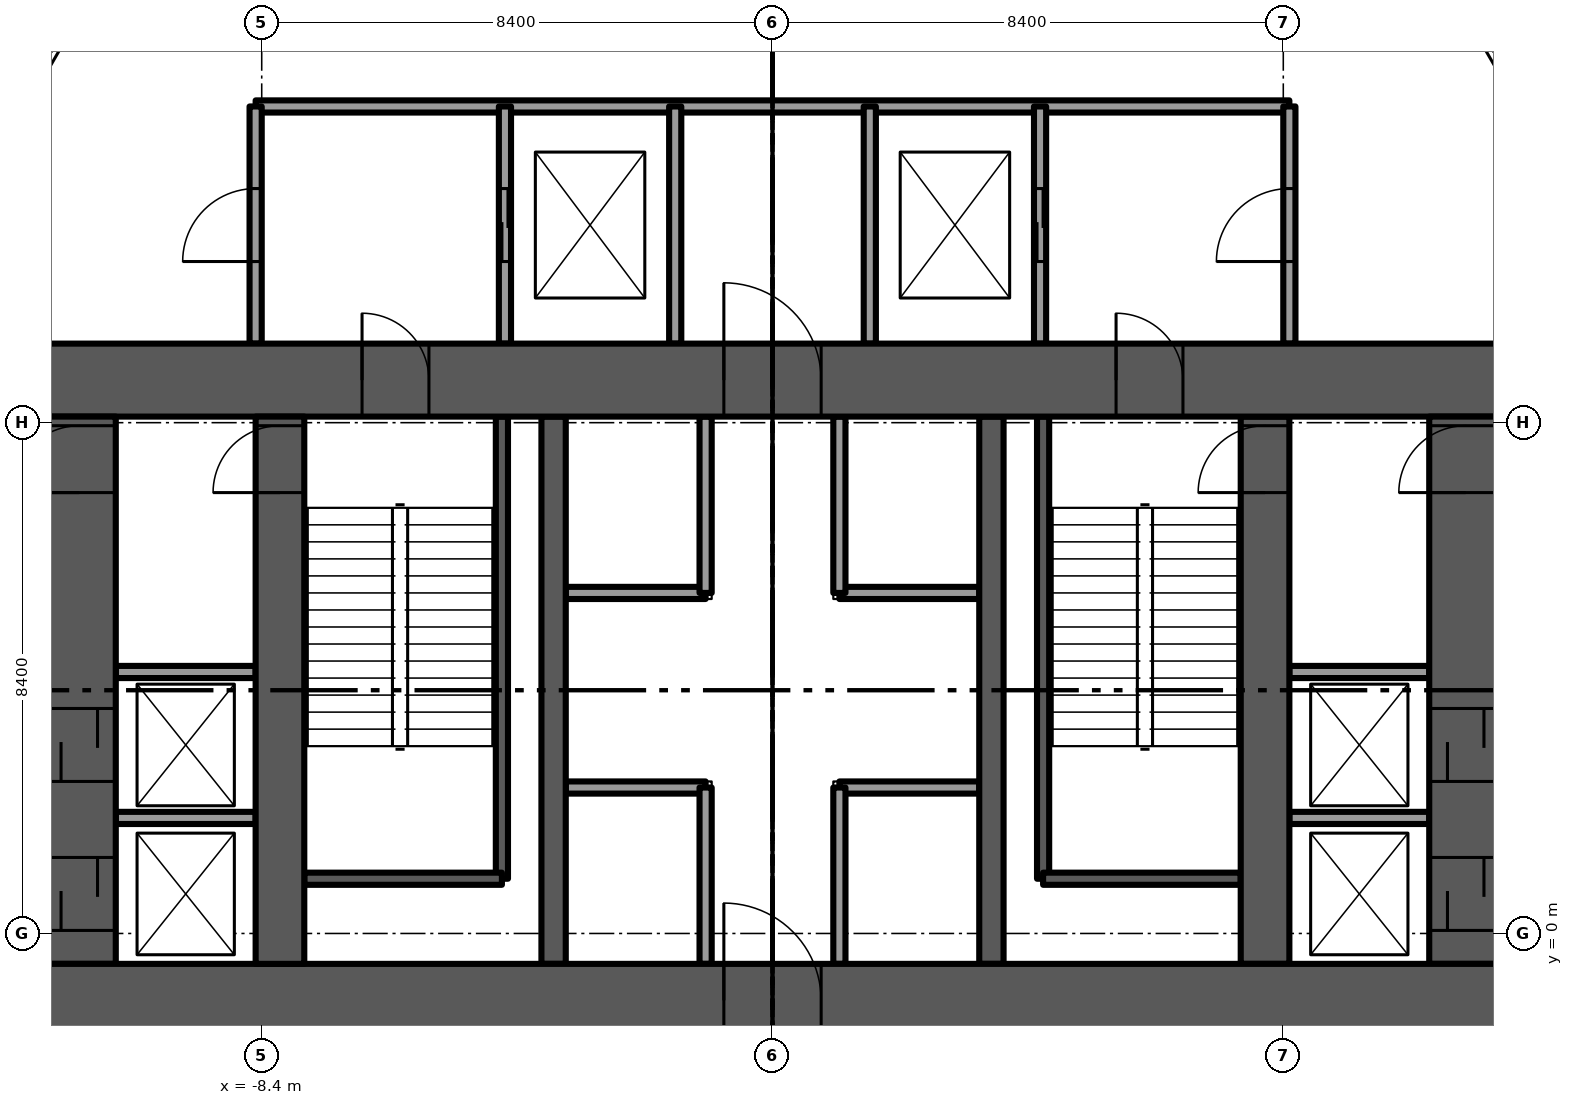
"""IFC4 building model, lengths in metres.
Left out: names, types, materials, properties, quantities, classifications, styles, units other than length and angle.
Written with IfcOpenShell. Run it as: python <this file> out.ifc"""

import sys

from ifc_helpers import new_model, si_unit, direction, frame, frame_2d, origin, place, context, subcontext, project, spatial, rectangle, extrude, element, fill, save


model = new_model("IFC4")
c1 = context("Model", 3, precision=1e-05, world=origin(), true_north=direction((0.0, 1.0)))
c2 = subcontext(c1, "Body", "Model", "MODEL_VIEW")
j1 = project(units=[si_unit("LENGTHUNIT", "METRE"), si_unit("PLANEANGLEUNIT", "RADIAN")], contexts=[c1])
p1 = place(None, origin())
s1 = spatial("IfcSite", under=j1, at=p1, CompositionType="ELEMENT")
p2 = place(p1, origin())
s2 = spatial("IfcBuilding", under=s1, at=p2, CompositionType="ELEMENT")
p3 = place(p2, frame((0.0, 0.0, 80.5)))
s3 = spatial("IfcBuildingStorey", under=s2, at=p3, CompositionType="ELEMENT", Elevation=80.5)
p4 = place(p3, frame((-12.0, -1.1, -0.3), z_axis=(0.0, 0.0, 1.0), x_axis=(1.0, 0.0, 0.0)))
e1 = element("IfcWall", 1, at=p4, inside=s3, PredefinedType="SHEAR", context=c2, shape_type="SweptSolid", body=[
    extrude(rectangle(XDim=24.0, YDim=1.2, at=frame_2d((12.0, 0.0))), origin(), (0.0, 0.0, 1.0), 5.0),
])
p5 = place(p4, frame((11.2, 0.0, 0.0)))
e2 = element("IfcOpeningElement", 2, at=p5, cuts=e1, PredefinedType="OPENING", context=c2, shape_type="SweptSolid", body=[
    extrude(rectangle(XDim=1.6, YDim=2.1, at=frame_2d((0.8, 1.05))), frame((0.0, 0.6, 0.0), z_axis=(0.0, -1.0, 0.0), x_axis=(1.0, 0.0, 0.0)), (0.0, 0.0, 1.0), 1.2),
])
p6 = place(p3, frame((-12.0, 9.1, -0.3), z_axis=(0.0, 0.0, 1.0), x_axis=(1.0, 0.0, 0.0)))
e3 = element("IfcWall", 3, at=p6, inside=s3, PredefinedType="SHEAR", context=c2, shape_type="SweptSolid", body=[
    extrude(rectangle(XDim=24.0, YDim=1.2, at=frame_2d((12.0, 0.0))), origin(), (0.0, 0.0, 1.0), 5.0),
])
p7 = place(p6, frame((11.2, 0.0, 0.0)))
e4 = element("IfcOpeningElement", 4, at=p7, cuts=e3, PredefinedType="OPENING", context=c2, shape_type="SweptSolid", body=[
    extrude(rectangle(XDim=1.6, YDim=2.1, at=frame_2d((0.8, 1.05))), frame((0.0, 0.6, 0.0), z_axis=(0.0, -1.0, 0.0), x_axis=(1.0, 0.0, 0.0)), (0.0, 0.0, 1.0), 1.2),
])
p8 = place(p6, frame((5.25, 0.0, 0.0)))
e5 = element("IfcOpeningElement", 5, at=p8, cuts=e3, PredefinedType="OPENING", context=c2, shape_type="SweptSolid", body=[
    extrude(rectangle(XDim=1.1, YDim=2.1, at=frame_2d((0.55, 1.05))), frame((0.0, 0.6, 0.0), z_axis=(0.0, -1.0, 0.0), x_axis=(1.0, 0.0, 0.0)), (0.0, 0.0, 1.0), 1.2),
])
p9 = place(p6, frame((17.65, 0.0, 0.0)))
e6 = element("IfcOpeningElement", 6, at=p9, cuts=e3, PredefinedType="OPENING", context=c2, shape_type="SweptSolid", body=[
    extrude(rectangle(XDim=1.1, YDim=2.1, at=frame_2d((0.55, 1.05))), frame((0.0, 0.6, 0.0), z_axis=(0.0, -1.0, 0.0), x_axis=(1.0, 0.0, 0.0)), (0.0, 0.0, 1.0), 1.2),
])
p10 = place(p3, frame((-8.1, -0.5, -0.3), z_axis=(0.0, 0.0, 1.0), x_axis=(0.0, 1.0, 0.0)))
e7 = element("IfcWall", 7, at=p10, inside=s3, PredefinedType="SHEAR", context=c2, shape_type="SweptSolid", body=[
    extrude(rectangle(XDim=9.0, YDim=0.8, at=frame_2d((4.5, 0.0))), origin(), (0.0, 0.0, 1.0), 5.0),
])
p11 = place(p10, frame((7.75, 0.0, 0.0)))
e8 = element("IfcOpeningElement", 8, at=p11, cuts=e7, PredefinedType="OPENING", context=c2, shape_type="SweptSolid", body=[
    extrude(rectangle(XDim=1.1, YDim=2.1, at=frame_2d((0.55, 1.05))), frame((0.0, 0.4, 0.0), z_axis=(0.0, -1.0, 0.0), x_axis=(1.0, 0.0, 0.0)), (0.0, 0.0, 1.0), 0.8),
])
p12 = place(p3, frame((8.1, -0.5, -0.3), z_axis=(0.0, 0.0, 1.0), x_axis=(0.0, 1.0, 0.0)))
e9 = element("IfcWall", 9, at=p12, inside=s3, PredefinedType="SHEAR", context=c2, shape_type="SweptSolid", body=[
    extrude(rectangle(XDim=9.0, YDim=0.8, at=frame_2d((4.5, 0.0))), origin(), (0.0, 0.0, 1.0), 5.0),
])
p13 = place(p12, frame((7.75, 0.0, 0.0)))
e10 = element("IfcOpeningElement", 10, at=p13, cuts=e9, PredefinedType="OPENING", context=c2, shape_type="SweptSolid", body=[
    extrude(rectangle(XDim=1.1, YDim=2.1, at=frame_2d((0.55, 1.05))), frame((0.0, 0.4, 0.0), z_axis=(0.0, -1.0, 0.0), x_axis=(1.0, 0.0, 0.0)), (0.0, 0.0, 1.0), 0.8),
])
for number, where, z_axis, x_axis in (
    (11, (-3.6, -0.5, -0.3), (0.0, 0.0, 1.0), (0.0, 1.0, 0.0)),
    (12, (3.6, -0.5, -0.3), (0.0, 0.0, 1.0), (0.0, 1.0, 0.0)),
):
    element("IfcWall", number, at=place(p3, frame(where, z_axis=z_axis, x_axis=x_axis)), inside=s3, PredefinedType="SHEAR", context=c2, shape_type="SweptSolid", body=[
        extrude(rectangle(XDim=9.0, YDim=0.4, at=frame_2d((4.5, 0.0))), origin(), (0.0, 0.0, 1.0), 5.0),
    ])
p14 = place(p3, frame((-11.4, -0.5, -0.3), z_axis=(0.0, 0.0, 1.0), x_axis=(0.0, 1.0, 0.0)))
e13 = element("IfcWall", 13, at=p14, inside=s3, PredefinedType="SHEAR", context=c2, shape_type="SweptSolid", body=[
    extrude(rectangle(XDim=9.0, YDim=1.2, at=frame_2d((4.5, 0.0))), origin(), (0.0, 0.0, 1.0), 5.0),
])
p15 = place(p14, frame((7.75, 0.0, 0.0)))
e14 = element("IfcOpeningElement", 14, at=p15, cuts=e13, PredefinedType="OPENING", context=c2, shape_type="SweptSolid", body=[
    extrude(rectangle(XDim=1.1, YDim=2.1, at=frame_2d((0.55, 1.05))), frame((0.0, 0.6, 0.0), z_axis=(0.0, -1.0, 0.0), x_axis=(1.0, 0.0, 0.0)), (0.0, 0.0, 1.0), 1.2),
])
p16 = place(p14, frame((0.55, 0.0, 0.0)))
e15 = element("IfcOpeningElement", 15, at=p16, cuts=e13, PredefinedType="OPENING", context=c2, shape_type="SweptSolid", body=[
    extrude(rectangle(XDim=1.2, YDim=2.1, at=frame_2d((0.6, 1.05))), frame((0.0, 0.6, 0.0), z_axis=(0.0, -1.0, 0.0), x_axis=(1.0, 0.0, 0.0)), (0.0, 0.0, 1.0), 1.2),
])
p17 = place(p14, frame((3.0, 0.0, 0.0)))
e16 = element("IfcOpeningElement", 16, at=p17, cuts=e13, PredefinedType="OPENING", context=c2, shape_type="SweptSolid", body=[
    extrude(rectangle(XDim=1.2, YDim=2.1, at=frame_2d((0.6, 1.05))), frame((0.0, 0.6, 0.0), z_axis=(0.0, -1.0, 0.0), x_axis=(1.0, 0.0, 0.0)), (0.0, 0.0, 1.0), 1.2),
])
p18 = place(p3, frame((11.4, -0.5, -0.3), z_axis=(0.0, 0.0, 1.0), x_axis=(0.0, 1.0, 0.0)))
e17 = element("IfcWall", 17, at=p18, inside=s3, PredefinedType="SHEAR", context=c2, shape_type="SweptSolid", body=[
    extrude(rectangle(XDim=9.0, YDim=1.2, at=frame_2d((4.5, 0.0))), origin(), (0.0, 0.0, 1.0), 5.0),
])
p19 = place(p18, frame((7.75, 0.0, 0.0)))
e18 = element("IfcOpeningElement", 18, at=p19, cuts=e17, PredefinedType="OPENING", context=c2, shape_type="SweptSolid", body=[
    extrude(rectangle(XDim=1.1, YDim=2.1, at=frame_2d((0.55, 1.05))), frame((0.0, 0.6, 0.0), z_axis=(0.0, -1.0, 0.0), x_axis=(1.0, 0.0, 0.0)), (0.0, 0.0, 1.0), 1.2),
])
p20 = place(p18, frame((0.55, 0.0, 0.0)))
e19 = element("IfcOpeningElement", 19, at=p20, cuts=e17, PredefinedType="OPENING", context=c2, shape_type="SweptSolid", body=[
    extrude(rectangle(XDim=1.2, YDim=2.1, at=frame_2d((0.6, 1.05))), frame((0.0, 0.6, 0.0), z_axis=(0.0, -1.0, 0.0), x_axis=(1.0, 0.0, 0.0)), (0.0, 0.0, 1.0), 1.2),
])
p21 = place(p18, frame((3.0, 0.0, 0.0)))
e20 = element("IfcOpeningElement", 20, at=p21, cuts=e17, PredefinedType="OPENING", context=c2, shape_type="SweptSolid", body=[
    extrude(rectangle(XDim=1.2, YDim=2.1, at=frame_2d((0.6, 1.05))), frame((0.0, 0.6, 0.0), z_axis=(0.0, -1.0, 0.0), x_axis=(1.0, 0.0, 0.0)), (0.0, 0.0, 1.0), 1.2),
])
for number, where, z_axis, x_axis in (
    (21, (-3.4, 2.4, 0.0), (0.0, 0.0, 1.0), (1.0, 0.0, 0.0)),
    (22, (-3.4, 5.6, 0.0), (0.0, 0.0, 1.0), (1.0, 0.0, 0.0)),
    (23, (1.1, 2.4, 0.0), (0.0, 0.0, 1.0), (1.0, 0.0, 0.0)),
    (24, (1.1, 5.6, 0.0), (0.0, 0.0, 1.0), (1.0, 0.0, 0.0)),
):
    element("IfcWall", number, at=place(p3, frame(where, z_axis=z_axis, x_axis=x_axis)), inside=s3, PredefinedType="PARTITIONING", context=c2, shape_type="SweptSolid", body=[
        extrude(rectangle(XDim=2.3, YDim=0.2, at=frame_2d((1.15, 0.0))), origin(), (0.0, 0.0, 1.0), 4.7),
    ])
for number, where, z_axis, x_axis in (
    (25, (-1.1, -0.5, 0.0), (0.0, 0.0, 1.0), (0.0, 1.0, 0.0)),
    (26, (1.1, -0.5, 0.0), (0.0, 0.0, 1.0), (0.0, 1.0, 0.0)),
    (27, (-1.1, 5.6, 0.0), (0.0, 0.0, 1.0), (0.0, 1.0, 0.0)),
    (28, (1.1, 5.6, 0.0), (0.0, 0.0, 1.0), (0.0, 1.0, 0.0)),
):
    element("IfcWall", number, at=place(p3, frame(where, z_axis=z_axis, x_axis=x_axis)), inside=s3, PredefinedType="PARTITIONING", context=c2, shape_type="SweptSolid", body=[
        extrude(rectangle(XDim=2.9, YDim=0.2, at=frame_2d((1.45, 0.0))), origin(), (0.0, 0.0, 1.0), 4.7),
    ])
p22 = place(p3, frame((-4.45, 0.9, -0.3), z_axis=(0.0, 0.0, 1.0), x_axis=(0.0, 1.0, 0.0)))
e29 = element("IfcWall", 29, at=p22, inside=s3, PredefinedType="SOLIDWALL", context=c2, shape_type="SweptSolid", body=[
    extrude(rectangle(XDim=7.6, YDim=0.2, at=frame_2d((3.8, 0.0))), origin(), (0.0, 0.0, 1.0), 5.0),
])
p23 = place(p3, frame((-7.7, 0.9, -0.3), z_axis=(0.0, 0.0, 1.0), x_axis=(1.0, 0.0, 0.0)))
e30 = element("IfcWall", 30, at=p23, inside=s3, PredefinedType="SOLIDWALL", context=c2, shape_type="SweptSolid", body=[
    extrude(rectangle(XDim=3.25, YDim=0.2, at=frame_2d((1.625, 0.0))), origin(), (0.0, 0.0, 1.0), 5.0),
])
p24 = place(p3, frame((4.45, 0.9, -0.3), z_axis=(0.0, 0.0, 1.0), x_axis=(0.0, 1.0, 0.0)))
e31 = element("IfcWall", 31, at=p24, inside=s3, PredefinedType="SOLIDWALL", context=c2, shape_type="SweptSolid", body=[
    extrude(rectangle(XDim=7.6, YDim=0.2, at=frame_2d((3.8, 0.0))), origin(), (0.0, 0.0, 1.0), 5.0),
])
p25 = place(p3, frame((4.45, 0.9, -0.3), z_axis=(0.0, 0.0, 1.0), x_axis=(1.0, 0.0, 0.0)))
e32 = element("IfcWall", 32, at=p25, inside=s3, PredefinedType="SOLIDWALL", context=c2, shape_type="SweptSolid", body=[
    extrude(rectangle(XDim=3.25, YDim=0.2, at=frame_2d((1.625, 0.0))), origin(), (0.0, 0.0, 1.0), 5.0),
])
p26 = place(p3, frame((-8.5, 13.6, 0.0), z_axis=(0.0, 0.0, 1.0), x_axis=(1.0, 0.0, 0.0)))
e33 = element("IfcWall", 33, at=p26, inside=s3, PredefinedType="PARTITIONING", context=c2, shape_type="SweptSolid", body=[
    extrude(rectangle(XDim=17.0, YDim=0.2, at=frame_2d((8.5, 0.0))), origin(), (0.0, 0.0, 1.0), 4.7),
])
p27 = place(p3, frame((-8.5, 9.7, 0.0), z_axis=(0.0, 0.0, 1.0), x_axis=(0.0, 1.0, 0.0)))
e34 = element("IfcWall", 34, at=p27, inside=s3, PredefinedType="PARTITIONING", context=c2, shape_type="SweptSolid", body=[
    extrude(rectangle(XDim=3.9, YDim=0.2, at=frame_2d((1.95, 0.0))), origin(), (0.0, 0.0, 1.0), 4.7),
])
p28 = place(p27, frame((1.35, 0.0, 0.0)))
e35 = element("IfcOpeningElement", 35, at=p28, cuts=e34, PredefinedType="OPENING", context=c2, shape_type="SweptSolid", body=[
    extrude(rectangle(XDim=1.2, YDim=2.1, at=frame_2d((0.6, 1.05))), frame((0.0, 0.1, 0.0), z_axis=(0.0, -1.0, 0.0), x_axis=(1.0, 0.0, 0.0)), (0.0, 0.0, 1.0), 0.2),
])
p29 = place(p3, frame((8.5, 9.7, 0.0), z_axis=(0.0, 0.0, 1.0), x_axis=(0.0, 1.0, 0.0)))
e36 = element("IfcWall", 36, at=p29, inside=s3, PredefinedType="PARTITIONING", context=c2, shape_type="SweptSolid", body=[
    extrude(rectangle(XDim=3.9, YDim=0.2, at=frame_2d((1.95, 0.0))), origin(), (0.0, 0.0, 1.0), 4.7),
])
p30 = place(p29, frame((1.35, 0.0, 0.0)))
e37 = element("IfcOpeningElement", 37, at=p30, cuts=e36, PredefinedType="OPENING", context=c2, shape_type="SweptSolid", body=[
    extrude(rectangle(XDim=1.2, YDim=2.1, at=frame_2d((0.6, 1.05))), frame((0.0, 0.1, 0.0), z_axis=(0.0, -1.0, 0.0), x_axis=(1.0, 0.0, 0.0)), (0.0, 0.0, 1.0), 0.2),
])
p31 = place(p3, frame((-4.4, 9.7, 0.0), z_axis=(0.0, 0.0, 1.0), x_axis=(0.0, 1.0, 0.0)))
e38 = element("IfcWall", 38, at=p31, inside=s3, PredefinedType="PARTITIONING", context=c2, shape_type="SweptSolid", body=[
    extrude(rectangle(XDim=3.9, YDim=0.2, at=frame_2d((1.95, 0.0))), origin(), (0.0, 0.0, 1.0), 4.7),
])
p32 = place(p31, frame((1.35, 0.0, 0.0)))
e39 = element("IfcOpeningElement", 39, at=p32, cuts=e38, PredefinedType="OPENING", context=c2, shape_type="SweptSolid", body=[
    extrude(rectangle(XDim=1.2, YDim=2.1, at=frame_2d((0.6, 1.05))), frame((0.0, 0.1, 0.0), z_axis=(0.0, -1.0, 0.0), x_axis=(1.0, 0.0, 0.0)), (0.0, 0.0, 1.0), 0.2),
])
p33 = place(p3, frame((4.4, 9.7, 0.0), z_axis=(0.0, 0.0, 1.0), x_axis=(0.0, 1.0, 0.0)))
e40 = element("IfcWall", 40, at=p33, inside=s3, PredefinedType="PARTITIONING", context=c2, shape_type="SweptSolid", body=[
    extrude(rectangle(XDim=3.9, YDim=0.2, at=frame_2d((1.95, 0.0))), origin(), (0.0, 0.0, 1.0), 4.7),
])
p34 = place(p33, frame((1.35, 0.0, 0.0)))
e41 = element("IfcOpeningElement", 41, at=p34, cuts=e40, PredefinedType="OPENING", context=c2, shape_type="SweptSolid", body=[
    extrude(rectangle(XDim=1.2, YDim=2.1, at=frame_2d((0.6, 1.05))), frame((0.0, 0.1, 0.0), z_axis=(0.0, -1.0, 0.0), x_axis=(1.0, 0.0, 0.0)), (0.0, 0.0, 1.0), 0.2),
])
for number, where, z_axis, x_axis in (
    (42, (-1.6, 9.7, 0.0), (0.0, 0.0, 1.0), (0.0, 1.0, 0.0)),
    (43, (1.6, 9.7, 0.0), (0.0, 0.0, 1.0), (0.0, 1.0, 0.0)),
):
    element("IfcWall", number, at=place(p3, frame(where, z_axis=z_axis, x_axis=x_axis)), inside=s3, PredefinedType="PARTITIONING", context=c2, shape_type="SweptSolid", body=[
        extrude(rectangle(XDim=3.9, YDim=0.2, at=frame_2d((1.95, 0.0))), origin(), (0.0, 0.0, 1.0), 4.7),
    ])
for number, where, z_axis, x_axis in (
    (44, (-10.8, 1.9, 0.0), (0.0, 0.0, 1.0), (1.0, 0.0, 0.0)),
    (45, (-10.8, 4.3, 0.0), (0.0, 0.0, 1.0), (1.0, 0.0, 0.0)),
    (46, (8.5, 1.9, 0.0), (0.0, 0.0, 1.0), (1.0, 0.0, 0.0)),
    (47, (8.5, 4.3, 0.0), (0.0, 0.0, 1.0), (1.0, 0.0, 0.0)),
):
    element("IfcWall", number, at=place(p3, frame(where, z_axis=z_axis, x_axis=x_axis)), inside=s3, PredefinedType="PARTITIONING", context=c2, shape_type="SweptSolid", body=[
        extrude(rectangle(XDim=2.3, YDim=0.2, at=frame_2d((1.15, 0.0))), origin(), (0.0, 0.0, 1.0), 4.7),
    ])
p35 = place(p5, origin())
e48 = element("IfcDoor", 48, at=p35, inside=s3, OperationType="DOUBLE_DOOR_SINGLE_SWING", PredefinedType="DOOR", context=c2, shape_type="SweptSolid", body=[
    extrude(rectangle(XDim=1.6, YDim=2.1, at=frame_2d((0.8, 1.05))), frame((0.0, 0.025, 0.0), z_axis=(0.0, -1.0, 0.0), x_axis=(1.0, 0.0, 0.0)), (0.0, 0.0, 1.0), 0.05),
])
fill(e2, e48)
p36 = place(p7, origin())
e49 = element("IfcDoor", 49, at=p36, inside=s3, OperationType="DOUBLE_DOOR_SINGLE_SWING", PredefinedType="DOOR", context=c2, shape_type="SweptSolid", body=[
    extrude(rectangle(XDim=1.6, YDim=2.1, at=frame_2d((0.8, 1.05))), frame((0.0, 0.025, 0.0), z_axis=(0.0, -1.0, 0.0), x_axis=(1.0, 0.0, 0.0)), (0.0, 0.0, 1.0), 0.05),
])
fill(e4, e49)
p37 = place(p8, origin())
e50 = element("IfcDoor", 50, at=p37, inside=s3, OperationType="SINGLE_SWING_LEFT", PredefinedType="DOOR", context=c2, shape_type="SweptSolid", body=[
    extrude(rectangle(XDim=1.1, YDim=2.1, at=frame_2d((0.55, 1.05))), frame((0.0, 0.025, 0.0), z_axis=(0.0, -1.0, 0.0), x_axis=(1.0, 0.0, 0.0)), (0.0, 0.0, 1.0), 0.05),
])
fill(e5, e50)
p38 = place(p11, origin())
e51 = element("IfcDoor", 51, at=p38, inside=s3, OperationType="SINGLE_SWING_RIGHT", PredefinedType="DOOR", context=c2, shape_type="SweptSolid", body=[
    extrude(rectangle(XDim=1.1, YDim=2.1, at=frame_2d((0.55, 1.05))), frame((0.0, 0.025, 0.0), z_axis=(0.0, -1.0, 0.0), x_axis=(1.0, 0.0, 0.0)), (0.0, 0.0, 1.0), 0.05),
])
fill(e8, e51)
p39 = place(p9, origin())
e52 = element("IfcDoor", 52, at=p39, inside=s3, OperationType="SINGLE_SWING_RIGHT", PredefinedType="DOOR", context=c2, shape_type="SweptSolid", body=[
    extrude(rectangle(XDim=1.1, YDim=2.1, at=frame_2d((0.55, 1.05))), frame((0.0, 0.025, 0.0), z_axis=(0.0, -1.0, 0.0), x_axis=(1.0, 0.0, 0.0)), (0.0, 0.0, 1.0), 0.05),
])
fill(e6, e52)
p40 = place(p13, origin())
e53 = element("IfcDoor", 53, at=p40, inside=s3, OperationType="SINGLE_SWING_LEFT", PredefinedType="DOOR", context=c2, shape_type="SweptSolid", body=[
    extrude(rectangle(XDim=1.1, YDim=2.1, at=frame_2d((0.55, 1.05))), frame((0.0, 0.025, 0.0), z_axis=(0.0, -1.0, 0.0), x_axis=(1.0, 0.0, 0.0)), (0.0, 0.0, 1.0), 0.05),
])
fill(e10, e53)
p41 = place(p32, origin())
e54 = element("IfcDoor", 54, at=p41, inside=s3, OperationType="SLIDING_TO_LEFT", PredefinedType="DOOR", context=c2, shape_type="SweptSolid", body=[
    extrude(rectangle(XDim=1.2, YDim=2.1, at=frame_2d((0.6, 1.05))), frame((0.0, 0.025, 0.0), z_axis=(0.0, -1.0, 0.0), x_axis=(1.0, 0.0, 0.0)), (0.0, 0.0, 1.0), 0.05),
])
fill(e39, e54)
p42 = place(p28, origin())
e55 = element("IfcDoor", 55, at=p42, inside=s3, OperationType="SINGLE_SWING_LEFT", PredefinedType="DOOR", context=c2, shape_type="SweptSolid", body=[
    extrude(rectangle(XDim=1.2, YDim=2.1, at=frame_2d((0.6, 1.05))), frame((0.0, 0.025, 0.0), z_axis=(0.0, -1.0, 0.0), x_axis=(1.0, 0.0, 0.0)), (0.0, 0.0, 1.0), 0.05),
])
fill(e35, e55)
p43 = place(p34, origin())
e56 = element("IfcDoor", 56, at=p43, inside=s3, OperationType="SLIDING_TO_LEFT", PredefinedType="DOOR", context=c2, shape_type="SweptSolid", body=[
    extrude(rectangle(XDim=1.2, YDim=2.1, at=frame_2d((0.6, 1.05))), frame((0.0, 0.025, 0.0), z_axis=(0.0, -1.0, 0.0), x_axis=(1.0, 0.0, 0.0)), (0.0, 0.0, 1.0), 0.05),
])
fill(e41, e56)
p44 = place(p30, origin())
e57 = element("IfcDoor", 57, at=p44, inside=s3, OperationType="SINGLE_SWING_LEFT", PredefinedType="DOOR", context=c2, shape_type="SweptSolid", body=[
    extrude(rectangle(XDim=1.2, YDim=2.1, at=frame_2d((0.6, 1.05))), frame((0.0, 0.025, 0.0), z_axis=(0.0, -1.0, 0.0), x_axis=(1.0, 0.0, 0.0)), (0.0, 0.0, 1.0), 0.05),
])
fill(e37, e57)
p45 = place(p15, origin())
e58 = element("IfcDoor", 58, at=p45, inside=s3, OperationType="SINGLE_SWING_LEFT", PredefinedType="DOOR", context=c2, shape_type="SweptSolid", body=[
    extrude(rectangle(XDim=1.1, YDim=2.1, at=frame_2d((0.55, 1.05))), frame((0.0, 0.025, 0.0), z_axis=(0.0, -1.0, 0.0), x_axis=(1.0, 0.0, 0.0)), (0.0, 0.0, 1.0), 0.05),
])
fill(e14, e58)
p46 = place(p16, origin())
e59 = element("IfcDoor", 59, at=p46, inside=s3, OperationType="SLIDING_TO_LEFT", PredefinedType="DOOR", context=c2, shape_type="SweptSolid", body=[
    extrude(rectangle(XDim=1.2, YDim=2.1, at=frame_2d((0.6, 1.05))), frame((0.0, 0.025, 0.0), z_axis=(0.0, -1.0, 0.0), x_axis=(1.0, 0.0, 0.0)), (0.0, 0.0, 1.0), 0.05),
])
fill(e15, e59)
p47 = place(p17, origin())
e60 = element("IfcDoor", 60, at=p47, inside=s3, OperationType="SLIDING_TO_LEFT", PredefinedType="DOOR", context=c2, shape_type="SweptSolid", body=[
    extrude(rectangle(XDim=1.2, YDim=2.1, at=frame_2d((0.6, 1.05))), frame((0.0, 0.025, 0.0), z_axis=(0.0, -1.0, 0.0), x_axis=(1.0, 0.0, 0.0)), (0.0, 0.0, 1.0), 0.05),
])
fill(e16, e60)
p48 = place(p19, origin())
e61 = element("IfcDoor", 61, at=p48, inside=s3, OperationType="SINGLE_SWING_RIGHT", PredefinedType="DOOR", context=c2, shape_type="SweptSolid", body=[
    extrude(rectangle(XDim=1.1, YDim=2.1, at=frame_2d((0.55, 1.05))), frame((0.0, 0.025, 0.0), z_axis=(0.0, -1.0, 0.0), x_axis=(1.0, 0.0, 0.0)), (0.0, 0.0, 1.0), 0.05),
])
fill(e18, e61)
p49 = place(p20, origin())
e62 = element("IfcDoor", 62, at=p49, inside=s3, OperationType="SLIDING_TO_LEFT", PredefinedType="DOOR", context=c2, shape_type="SweptSolid", body=[
    extrude(rectangle(XDim=1.2, YDim=2.1, at=frame_2d((0.6, 1.05))), frame((0.0, 0.025, 0.0), z_axis=(0.0, -1.0, 0.0), x_axis=(1.0, 0.0, 0.0)), (0.0, 0.0, 1.0), 0.05),
])
fill(e19, e62)
p50 = place(p21, origin())
e63 = element("IfcDoor", 63, at=p50, inside=s3, OperationType="SLIDING_TO_LEFT", PredefinedType="DOOR", context=c2, shape_type="SweptSolid", body=[
    extrude(rectangle(XDim=1.2, YDim=2.1, at=frame_2d((0.6, 1.05))), frame((0.0, 0.025, 0.0), z_axis=(0.0, -1.0, 0.0), x_axis=(1.0, 0.0, 0.0)), (0.0, 0.0, 1.0), 0.05),
])
fill(e20, e63)
save(model, sys.argv[1])
